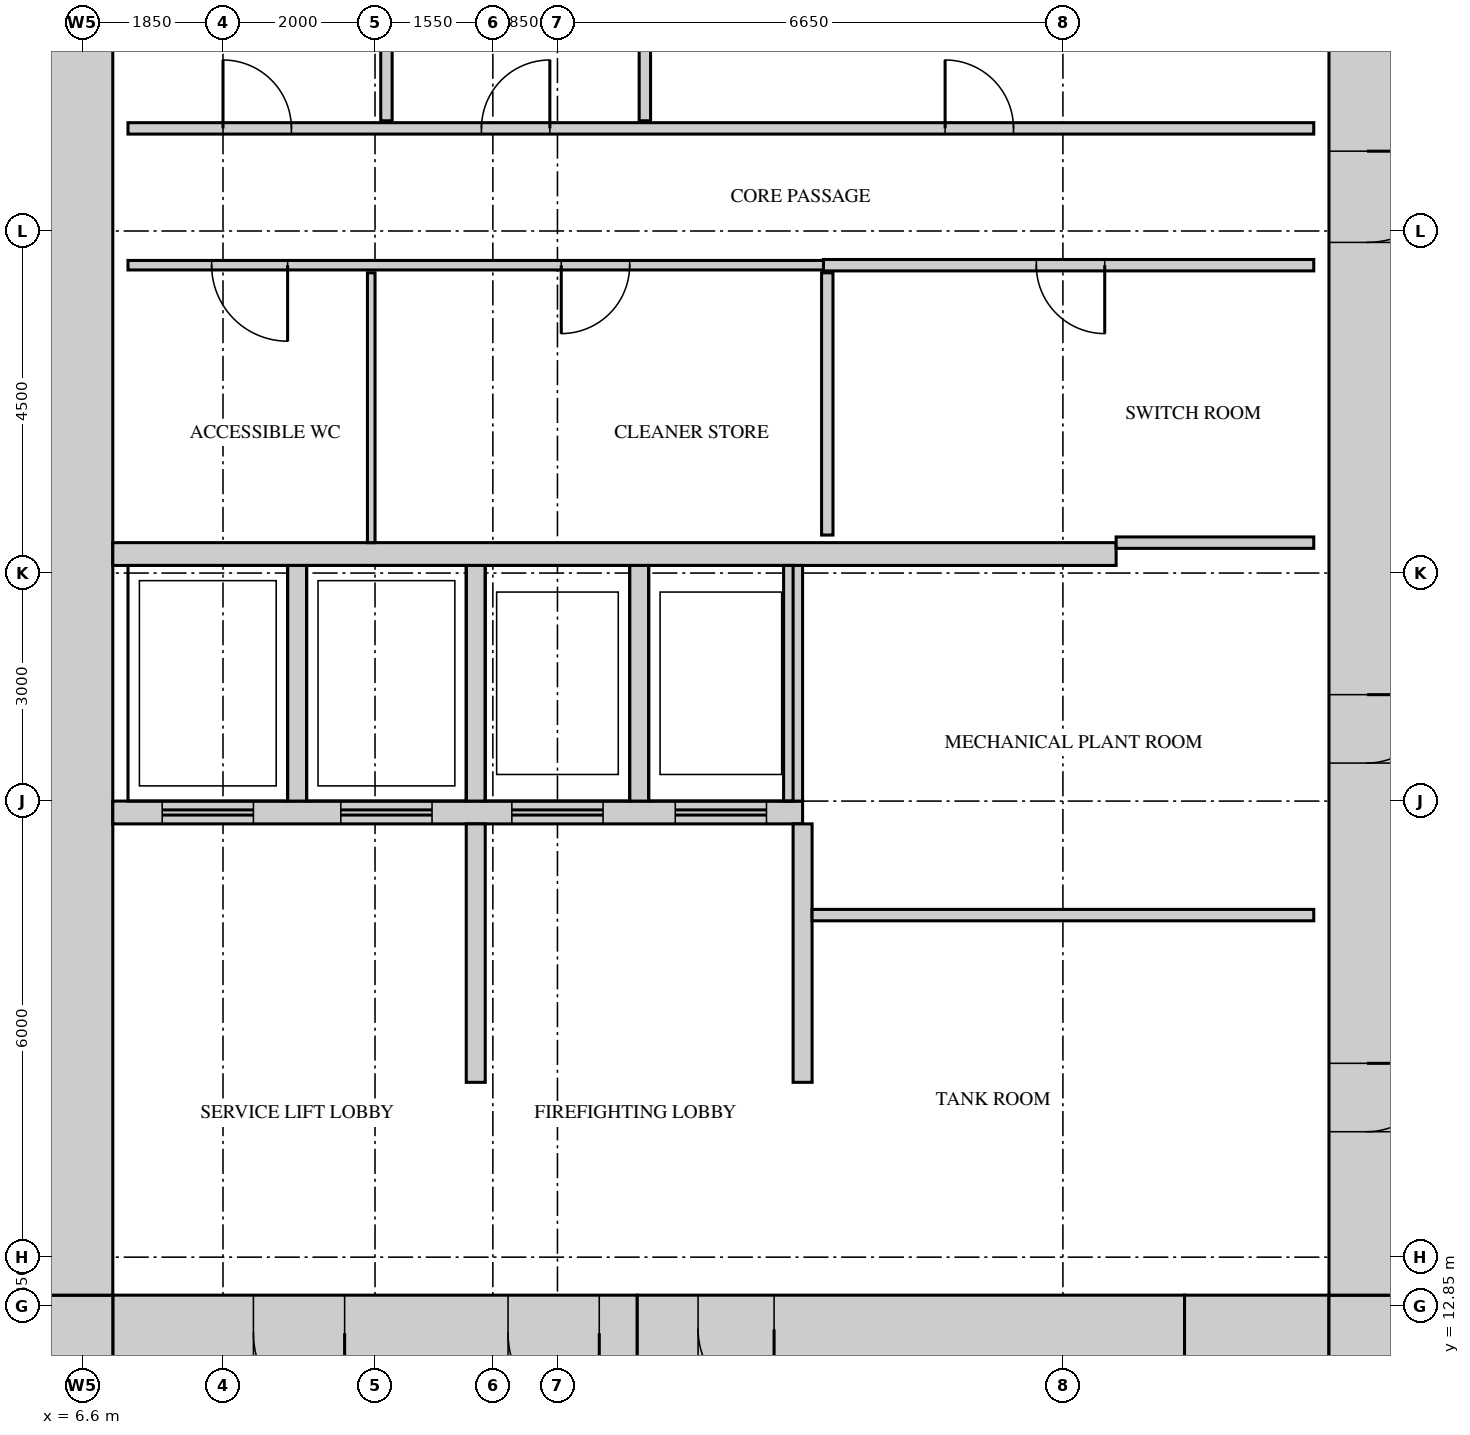
"""IFC4 building model, lengths in metres.
Left out: names, types, materials, properties, quantities, classifications, styles, units other than length and angle.
Written with IfcOpenShell. Run it as: python <this file> out.ifc"""

import sys

from ifc_helpers import new_model, si_unit, direction, frame, frame_2d, origin, place, context, subcontext, project, spatial, rectangle, extrude, source, transform, mapped, element, fill, save


model = new_model("IFC4")
c1 = context("Model", 3, precision=1e-05, world=origin(), true_north=direction((0.0, 1.0)))
c2 = subcontext(c1, "Body", "Model", "MODEL_VIEW")
j1 = project(units=[si_unit("LENGTHUNIT", "METRE"), si_unit("PLANEANGLEUNIT", "RADIAN")], contexts=[c1])
p1 = place(None, origin())
s1 = spatial("IfcSite", under=j1, at=p1, CompositionType="ELEMENT")
p2 = place(p1, origin())
s2 = spatial("IfcBuilding", under=s1, at=p2, CompositionType="ELEMENT")
p3 = place(p2, frame((0.0, 0.0, 123.5)))
s3 = spatial("IfcBuildingStorey", under=s2, at=p3, CompositionType="ELEMENT", Elevation=123.5)
m1 = source(origin(), c2, "Body", "SweptSolid", [
    extrude(rectangle(XDim=6.9, YDim=1.0, at=frame_2d((3.45, 0.0))), origin(), (0.0, 0.0, 1.0), 4.1),
])
p4 = place(p3, frame((7.0, 12.5, 0.0), z_axis=(0.0, 0.0, 1.0), x_axis=(1.0, 0.0, 0.0)))
e1 = element("IfcWall", 1, at=p4, inside=s3, PredefinedType="SHEAR", context=c2, shape_type="MappedRepresentation", body=[
    mapped(m1, transform((0.0, 0.0, 0.0))),
])
m2 = source(origin(), c2, "Body", "SweptSolid", [
    extrude(rectangle(XDim=1.2, YDim=2.1, at=frame_2d((0.6, 1.05))), frame((0.0, 0.51, 0.0), z_axis=(0.0, -1.0, 0.0), x_axis=(1.0, 0.0, 0.0)), (0.0, 0.0, 1.0), 1.02),
])
p5 = place(p4, frame((5.2, 0.0, 0.0)))
e2 = element("IfcOpeningElement", 2, at=p5, cuts=e1, PredefinedType="OPENING", context=c2, shape_type="MappedRepresentation", body=[
    mapped(m2, transform((0.0, 0.0, 0.0))),
])
p6 = place(p4, frame((1.85, 0.0, 0.0)))
e3 = element("IfcOpeningElement", 3, at=p6, cuts=e1, PredefinedType="OPENING", context=c2, shape_type="MappedRepresentation", body=[
    mapped(m2, transform((0.0, 0.0, 0.0))),
])
m3 = source(origin(), c2, "Body", "SweptSolid", [
    extrude(rectangle(XDim=7.2, YDim=0.9, at=frame_2d((3.6, 0.0))), origin(), (0.0, 0.0, 1.0), 4.1),
])
p7 = place(p3, frame((13.9, 12.55, 0.0), z_axis=(0.0, 0.0, 1.0), x_axis=(1.0, 0.0, 0.0)))
e4 = element("IfcWall", 4, at=p7, inside=s3, PredefinedType="SHEAR", context=c2, shape_type="MappedRepresentation", body=[
    mapped(m3, transform((0.0, 0.0, 0.0))),
])
m4 = source(origin(), c2, "Body", "SweptSolid", [
    extrude(rectangle(XDim=1.0, YDim=2.1, at=frame_2d((0.5, 1.05))), frame((0.0, 0.46, 0.0), z_axis=(0.0, -1.0, 0.0), x_axis=(1.0, 0.0, 0.0)), (0.0, 0.0, 1.0), 0.92),
])
p8 = place(p7, frame((0.8, 0.0, 0.0)))
e5 = element("IfcOpeningElement", 5, at=p8, cuts=e4, PredefinedType="OPENING", context=c2, shape_type="MappedRepresentation", body=[
    mapped(m4, transform((0.0, 0.0, 0.0))),
])
m5 = source(origin(), c2, "Body", "SweptSolid", [
    extrude(rectangle(XDim=1.9, YDim=1.0, at=frame_2d((0.95, 0.0))), origin(), (0.0, 0.0, 1.0), 4.1),
])
p9 = place(p3, frame((21.1, 12.5, 0.0), z_axis=(0.0, 0.0, 1.0), x_axis=(1.0, 0.0, 0.0)))
e6 = element("IfcWall", 6, at=p9, inside=s3, PredefinedType="SHEAR", context=c2, shape_type="MappedRepresentation", body=[
    mapped(m5, transform((0.0, 0.0, 0.0))),
])
m6 = source(origin(), c2, "Body", "SweptSolid", [
    extrude(rectangle(XDim=1.0, YDim=1.0, at=frame_2d((0.5, 0.0))), origin(), (0.0, 0.0, 1.0), 4.1),
])
for number, where, z_axis, x_axis in (
    (7, (23.0, 12.5, 0.0), (0.0, 0.0, 1.0), (1.0, 0.0, 0.0)),
    (8, (6.0, 12.5, 0.0), (0.0, 0.0, 1.0), (1.0, 0.0, 0.0)),
):
    element("IfcWall", number, at=place(p3, frame(where, z_axis=z_axis, x_axis=x_axis)), inside=s3, PredefinedType="SHEAR", context=c2, shape_type="MappedRepresentation", body=[
        mapped(m6, transform((0.0, 0.0, 0.0))),
    ])
m7 = source(origin(), c2, "Body", "SweptSolid", [
    extrude(rectangle(XDim=28.0, YDim=1.0, at=frame_2d((14.0, 0.0))), origin(), (0.0, 0.0, 1.0), 4.1),
])
p10 = place(p3, frame((23.5, 13.0, 0.0), z_axis=(0.0, 0.0, 1.0), x_axis=(0.0, 1.0, 0.0)))
e9 = element("IfcWall", 9, at=p10, inside=s3, PredefinedType="SHEAR", context=c2, shape_type="MappedRepresentation", body=[
    mapped(m7, transform((0.0, 0.0, 0.0))),
])
m8 = source(origin(), c2, "Body", "SweptSolid", [
    extrude(rectangle(XDim=1.8, YDim=2.1, at=frame_2d((0.9, 1.05))), frame((0.0, 0.51, 0.0), z_axis=(0.0, -1.0, 0.0), x_axis=(1.0, 0.0, 0.0)), (0.0, 0.0, 1.0), 1.02),
])
p11 = place(p10, frame((22.6, 0.0, 0.0)))
e10 = element("IfcOpeningElement", 10, at=p11, cuts=e9, PredefinedType="OPENING", context=c2, shape_type="MappedRepresentation", body=[
    mapped(m8, transform((0.0, 0.0, 0.0))),
])
p12 = place(p10, frame((13.85, 0.0, 0.0)))
e11 = element("IfcOpeningElement", 11, at=p12, cuts=e9, PredefinedType="OPENING", context=c2, shape_type="MappedRepresentation", body=[
    mapped(m2, transform((0.0, 0.0, 0.0))),
])
m9 = source(origin(), c2, "Body", "SweptSolid", [
    extrude(rectangle(XDim=0.9, YDim=2.1, at=frame_2d((0.45, 1.05))), frame((0.0, 0.51, 0.0), z_axis=(0.0, -1.0, 0.0), x_axis=(1.0, 0.0, 0.0)), (0.0, 0.0, 1.0), 1.02),
])
p13 = place(p10, frame((2.15, 0.0, 0.0)))
e12 = element("IfcOpeningElement", 12, at=p13, cuts=e9, PredefinedType="OPENING", context=c2, shape_type="MappedRepresentation", body=[
    mapped(m9, transform((0.0, 0.0, 0.0))),
])
p14 = place(p10, frame((7.0, 0.0, 0.0)))
e13 = element("IfcOpeningElement", 13, at=p14, cuts=e9, PredefinedType="OPENING", context=c2, shape_type="MappedRepresentation", body=[
    mapped(m9, transform((0.0, 0.0, 0.0))),
])
p15 = place(p3, frame((6.5, 13.0, 0.0), z_axis=(0.0, 0.0, 1.0), x_axis=(0.0, 1.0, 0.0)))
e14 = element("IfcWall", 14, at=p15, inside=s3, PredefinedType="SHEAR", context=c2, shape_type="MappedRepresentation", body=[
    mapped(m7, transform((0.0, 0.0, 0.0))),
])
m10 = source(origin(), c2, "Body", "SweptSolid", [
    extrude(rectangle(XDim=13.2, YDim=0.3, at=frame_2d((6.6, 0.0))), origin(), (0.0, 0.0, 1.0), 4.1),
])
p16 = place(p3, frame((7.0, 22.75, 0.0), z_axis=(0.0, 0.0, 1.0), x_axis=(1.0, 0.0, 0.0)))
e15 = element("IfcWall", 15, at=p16, inside=s3, PredefinedType="STANDARD", context=c2, shape_type="MappedRepresentation", body=[
    mapped(m10, transform((0.0, 0.0, 0.0))),
])
m11 = source(origin(), c2, "Body", "SweptSolid", [
    extrude(rectangle(XDim=9.075, YDim=0.3, at=frame_2d((4.538, 0.0))), origin(), (0.0, 0.0, 1.0), 4.1),
])
p17 = place(p3, frame((7.0, 19.35, 0.0), z_axis=(0.0, 0.0, 1.0), x_axis=(1.0, 0.0, 0.0)))
e16 = element("IfcWall", 16, at=p17, inside=s3, PredefinedType="STANDARD", context=c2, shape_type="MappedRepresentation", body=[
    mapped(m11, transform((0.0, 0.0, 0.0))),
])
m12 = source(origin(), c2, "Body", "SweptSolid", [
    extrude(rectangle(XDim=1.2, YDim=2.1, at=frame_2d((0.6, 1.05))), frame((0.0, 0.16, 0.0), z_axis=(0.0, -1.0, 0.0), x_axis=(1.0, 0.0, 0.0)), (0.0, 0.0, 1.0), 0.32),
])
p18 = place(p17, frame((0.65, 0.0, 0.0)))
e17 = element("IfcOpeningElement", 17, at=p18, cuts=e16, PredefinedType="OPENING", context=c2, shape_type="MappedRepresentation", body=[
    mapped(m12, transform((0.0, 0.0, 0.0))),
])
p19 = place(p17, frame((3.0, 0.0, 0.0)))
e18 = element("IfcOpeningElement", 18, at=p19, cuts=e16, PredefinedType="OPENING", context=c2, shape_type="MappedRepresentation", body=[
    mapped(m12, transform((0.0, 0.0, 0.0))),
])
p20 = place(p17, frame((5.25, 0.0, 0.0)))
e19 = element("IfcOpeningElement", 19, at=p20, cuts=e16, PredefinedType="OPENING", context=c2, shape_type="MappedRepresentation", body=[
    mapped(m12, transform((0.0, 0.0, 0.0))),
])
p21 = place(p17, frame((7.4, 0.0, 0.0)))
e20 = element("IfcOpeningElement", 20, at=p21, cuts=e16, PredefinedType="OPENING", context=c2, shape_type="MappedRepresentation", body=[
    mapped(m12, transform((0.0, 0.0, 0.0))),
])
m13 = source(origin(), c2, "Body", "SweptSolid", [
    extrude(rectangle(XDim=3.1, YDim=0.25, at=frame_2d((1.55, 0.0))), origin(), (0.0, 0.0, 1.0), 4.1),
])
for number, where, z_axis, x_axis in (
    (21, (9.425, 19.5, 0.0), (0.0, 0.0, 1.0), (0.0, 1.0, 0.0)),
    (22, (11.775, 19.5, 0.0), (0.0, 0.0, 1.0), (0.0, 1.0, 0.0)),
    (23, (13.925, 19.5, 0.0), (0.0, 0.0, 1.0), (0.0, 1.0, 0.0)),
    (24, (15.95, 19.5, 0.0), (0.0, 0.0, 1.0), (0.0, 1.0, 0.0)),
):
    element("IfcWall", number, at=place(p3, frame(where, z_axis=z_axis, x_axis=x_axis)), inside=s3, PredefinedType="STANDARD", context=c2, shape_type="MappedRepresentation", body=[
        mapped(m13, transform((0.0, 0.0, 0.0))),
    ])
m14 = source(origin(), c2, "Body", "SweptSolid", [
    extrude(rectangle(XDim=3.4, YDim=0.25, at=frame_2d((1.7, 0.0))), origin(), (0.0, 0.0, 1.0), 4.1),
])
for number, where, z_axis, x_axis in (
    (25, (16.075, 15.8, 0.0), (0.0, 0.0, 1.0), (0.0, 1.0, 0.0)),
    (26, (11.775, 15.8, 0.0), (0.0, 0.0, 1.0), (0.0, 1.0, 0.0)),
):
    element("IfcWall", number, at=place(p3, frame(where, z_axis=z_axis, x_axis=x_axis)), inside=s3, PredefinedType="STANDARD", context=c2, shape_type="MappedRepresentation", body=[
        mapped(m14, transform((0.0, 0.0, 0.0))),
    ])
m15 = source(origin(), c2, "Body", "SweptSolid", [
    extrude(rectangle(XDim=6.6, YDim=0.15, at=frame_2d((3.3, 0.0))), origin(), (0.0, 0.0, 1.0), 4.2),
])
p22 = place(p3, frame((16.2, 18.0, 0.0), z_axis=(0.0, 0.0, 1.0), x_axis=(1.0, 0.0, 0.0)))
e27 = element("IfcWall", 27, at=p22, inside=s3, PredefinedType="PARTITIONING", context=c2, shape_type="MappedRepresentation", body=[
    mapped(m15, transform((0.0, 0.0, 0.0))),
])
m16 = source(origin(), c2, "Body", "SweptSolid", [
    extrude(rectangle(XDim=3.55, YDim=0.1, at=frame_2d((1.775, 0.0))), origin(), (0.0, 0.0, 1.0), 4.2),
])
p23 = place(p3, frame((10.4, 22.9, 0.0), z_axis=(0.0, 0.0, 1.0), x_axis=(0.0, 1.0, 0.0)))
e28 = element("IfcWall", 28, at=p23, inside=s3, PredefinedType="PARTITIONING", context=c2, shape_type="MappedRepresentation", body=[
    mapped(m16, transform((0.0, 0.0, 0.0))),
])
m17 = source(origin(), c2, "Body", "SweptSolid", [
    extrude(rectangle(XDim=2.6, YDim=0.15, at=frame_2d((1.3, 0.0))), origin(), (0.0, 0.0, 1.0), 4.2),
])
p24 = place(p3, frame((20.2, 22.9, 0.0), z_axis=(0.0, 0.0, 1.0), x_axis=(1.0, 0.0, 0.0)))
e29 = element("IfcWall", 29, at=p24, inside=s3, PredefinedType="PARTITIONING", context=c2, shape_type="MappedRepresentation", body=[
    mapped(m17, transform((0.0, 0.0, 0.0))),
])
m18 = source(origin(), c2, "Body", "SweptSolid", [
    extrude(rectangle(XDim=3.45, YDim=0.15, at=frame_2d((1.725, 0.0))), origin(), (0.0, 0.0, 1.0), 4.2),
])
p25 = place(p3, frame((16.4, 23.0, 0.0), z_axis=(0.0, 0.0, 1.0), x_axis=(0.0, 1.0, 0.0)))
e30 = element("IfcWall", 30, at=p25, inside=s3, PredefinedType="PARTITIONING", context=c2, shape_type="MappedRepresentation", body=[
    mapped(m18, transform((0.0, 0.0, 0.0))),
])
m19 = source(origin(), c2, "Body", "SweptSolid", [
    extrude(rectangle(XDim=9.15, YDim=0.125, at=frame_2d((4.575, 0.0))), origin(), (0.0, 0.0, 1.0), 4.2),
])
p26 = place(p3, frame((7.2, 26.55, 0.0), z_axis=(0.0, 0.0, 1.0), x_axis=(1.0, 0.0, 0.0)))
e31 = element("IfcWall", 31, at=p26, inside=s3, PredefinedType="PARTITIONING", context=c2, shape_type="MappedRepresentation", body=[
    mapped(m19, transform((0.0, 0.0, 0.0))),
])
m20 = source(origin(), c2, "Body", "SweptSolid", [
    extrude(rectangle(XDim=1.0, YDim=2.1, at=frame_2d((0.5, 1.05))), frame((0.0, 0.073, 0.0), z_axis=(0.0, -1.0, 0.0), x_axis=(1.0, 0.0, 0.0)), (0.0, 0.0, 1.0), 0.145),
])
p27 = place(p26, frame((1.1, 0.0, 0.0)))
e32 = element("IfcOpeningElement", 32, at=p27, cuts=e31, PredefinedType="OPENING", context=c2, shape_type="MappedRepresentation", body=[
    mapped(m20, transform((0.0, 0.0, 0.0))),
])
m21 = source(origin(), c2, "Body", "SweptSolid", [
    extrude(rectangle(XDim=0.9, YDim=2.1, at=frame_2d((0.45, 1.05))), frame((0.0, 0.073, 0.0), z_axis=(0.0, -1.0, 0.0), x_axis=(1.0, 0.0, 0.0)), (0.0, 0.0, 1.0), 0.145),
])
p28 = place(p26, frame((5.7, 0.0, 0.0)))
e33 = element("IfcOpeningElement", 33, at=p28, cuts=e31, PredefinedType="OPENING", context=c2, shape_type="MappedRepresentation", body=[
    mapped(m21, transform((0.0, 0.0, 0.0))),
])
m22 = source(origin(), c2, "Body", "SweptSolid", [
    extrude(rectangle(XDim=6.45, YDim=0.15, at=frame_2d((3.225, 0.0))), origin(), (0.0, 0.0, 1.0), 4.2),
])
p29 = place(p3, frame((16.35, 26.55, 0.0), z_axis=(0.0, 0.0, 1.0), x_axis=(1.0, 0.0, 0.0)))
e34 = element("IfcWall", 34, at=p29, inside=s3, PredefinedType="PARTITIONING", context=c2, shape_type="MappedRepresentation", body=[
    mapped(m22, transform((0.0, 0.0, 0.0))),
])
m23 = source(origin(), c2, "Body", "SweptSolid", [
    extrude(rectangle(XDim=0.9, YDim=2.1, at=frame_2d((0.45, 1.05))), frame((0.0, 0.085, 0.0), z_axis=(0.0, -1.0, 0.0), x_axis=(1.0, 0.0, 0.0)), (0.0, 0.0, 1.0), 0.17),
])
p30 = place(p29, frame((2.8, 0.0, 0.0)))
e35 = element("IfcOpeningElement", 35, at=p30, cuts=e34, PredefinedType="OPENING", context=c2, shape_type="MappedRepresentation", body=[
    mapped(m23, transform((0.0, 0.0, 0.0))),
])
m24 = source(origin(), c2, "Body", "SweptSolid", [
    extrude(rectangle(XDim=15.6, YDim=0.15, at=frame_2d((7.8, 0.0))), origin(), (0.0, 0.0, 1.0), 4.2),
])
p31 = place(p3, frame((7.2, 28.35, 0.0), z_axis=(0.0, 0.0, 1.0), x_axis=(1.0, 0.0, 0.0)))
e36 = element("IfcWall", 36, at=p31, inside=s3, PredefinedType="PARTITIONING", context=c2, shape_type="MappedRepresentation", body=[
    mapped(m24, transform((0.0, 0.0, 0.0))),
])
p32 = place(p31, frame((1.25, 0.0, 0.0)))
e37 = element("IfcOpeningElement", 37, at=p32, cuts=e36, PredefinedType="OPENING", context=c2, shape_type="MappedRepresentation", body=[
    mapped(m23, transform((0.0, 0.0, 0.0))),
])
p33 = place(p31, frame((4.65, 0.0, 0.0)))
e38 = element("IfcOpeningElement", 38, at=p33, cuts=e36, PredefinedType="OPENING", context=c2, shape_type="MappedRepresentation", body=[
    mapped(m23, transform((0.0, 0.0, 0.0))),
])
p34 = place(p31, frame((10.75, 0.0, 0.0)))
e39 = element("IfcOpeningElement", 39, at=p34, cuts=e36, PredefinedType="OPENING", context=c2, shape_type="MappedRepresentation", body=[
    mapped(m23, transform((0.0, 0.0, 0.0))),
])
for number, where, z_axis, x_axis in (
    (40, (10.6, 28.45, 0.0), (0.0, 0.0, 1.0), (0.0, 1.0, 0.0)),
    (41, (14.0, 28.45, 0.0), (0.0, 0.0, 1.0), (0.0, 1.0, 0.0)),
):
    element("IfcWall", number, at=place(p3, frame(where, z_axis=z_axis, x_axis=x_axis)), inside=s3, PredefinedType="PARTITIONING", context=c2, shape_type="MappedRepresentation", body=[
        mapped(m18, transform((0.0, 0.0, 0.0))),
    ])
m25 = source(origin(), c2, "Body", "SweptSolid", [
    extrude(rectangle(XDim=1.2, YDim=2.1, at=frame_2d((0.6, 1.05))), frame((0.0, 0.45, 0.0), z_axis=(0.0, -1.0, 0.0), x_axis=(1.0, 0.0, 0.0)), (0.0, 0.0, 1.0), 0.9),
])
p35 = place(p12, origin())
e42 = element("IfcDoor", 42, at=p35, inside=s3, OperationType="SINGLE_SWING_RIGHT", PredefinedType="DOOR", context=c2, shape_type="MappedRepresentation", body=[
    mapped(m25, transform((0.0, 0.0, 0.0))),
])
fill(e11, e42)
m26 = source(origin(), c2, "Body", "SweptSolid", [
    extrude(rectangle(XDim=0.9, YDim=2.1, at=frame_2d((0.45, 1.05))), frame((0.0, 0.025, 0.0), z_axis=(0.0, -1.0, 0.0), x_axis=(1.0, 0.0, 0.0)), (0.0, 0.0, 1.0), 0.05),
])
p36 = place(p32, origin())
e43 = element("IfcDoor", 43, at=p36, inside=s3, OperationType="SINGLE_SWING_RIGHT", PredefinedType="DOOR", context=c2, shape_type="MappedRepresentation", body=[
    mapped(m26, transform((0.0, 0.0, 0.0))),
])
fill(e37, e43)
p37 = place(p33, origin())
e44 = element("IfcDoor", 44, at=p37, inside=s3, OperationType="SINGLE_SWING_LEFT", PredefinedType="DOOR", context=c2, shape_type="MappedRepresentation", body=[
    mapped(m26, transform((0.0, 0.0, 0.0))),
])
fill(e38, e44)
p38 = place(p34, origin())
e45 = element("IfcDoor", 45, at=p38, inside=s3, OperationType="SINGLE_SWING_RIGHT", PredefinedType="DOOR", context=c2, shape_type="MappedRepresentation", body=[
    mapped(m26, transform((0.0, 0.0, 0.0))),
])
fill(e39, e45)
m27 = source(origin(), c2, "Body", "SweptSolid", [
    extrude(rectangle(XDim=1.0, YDim=2.1, at=frame_2d((0.5, 1.05))), frame((0.0, 0.025, 0.0), z_axis=(0.0, -1.0, 0.0), x_axis=(1.0, 0.0, 0.0)), (0.0, 0.0, 1.0), 0.05),
])
p39 = place(p27, origin())
e46 = element("IfcDoor", 46, at=p39, inside=s3, OperationType="SINGLE_SWING_RIGHT", PredefinedType="DOOR", context=c2, shape_type="MappedRepresentation", body=[
    mapped(m27, transform((0.0, 0.0, 0.0))),
])
fill(e32, e46)
p40 = place(p28, origin())
e47 = element("IfcDoor", 47, at=p40, inside=s3, OperationType="SINGLE_SWING_LEFT", PredefinedType="DOOR", context=c2, shape_type="MappedRepresentation", body=[
    mapped(m26, transform((0.0, 0.0, 0.0))),
])
fill(e33, e47)
p41 = place(p30, origin())
e48 = element("IfcDoor", 48, at=p41, inside=s3, OperationType="SINGLE_SWING_RIGHT", PredefinedType="DOOR", context=c2, shape_type="MappedRepresentation", body=[
    mapped(m26, transform((0.0, 0.0, 0.0))),
])
fill(e35, e48)
m28 = source(origin(), c2, "Body", "SweptSolid", [
    extrude(rectangle(XDim=0.9, YDim=2.1, at=frame_2d((0.45, 1.05))), frame((0.0, 0.45, 0.0), z_axis=(0.0, -1.0, 0.0), x_axis=(1.0, 0.0, 0.0)), (0.0, 0.0, 1.0), 0.9),
])
p42 = place(p13, origin())
e49 = element("IfcDoor", 49, at=p42, inside=s3, OperationType="SINGLE_SWING_RIGHT", PredefinedType="DOOR", context=c2, shape_type="MappedRepresentation", body=[
    mapped(m28, transform((0.0, 0.0, 0.0))),
])
fill(e12, e49)
p43 = place(p14, origin())
e50 = element("IfcDoor", 50, at=p43, inside=s3, OperationType="SINGLE_SWING_RIGHT", PredefinedType="DOOR", context=c2, shape_type="MappedRepresentation", body=[
    mapped(m28, transform((0.0, 0.0, 0.0))),
])
fill(e13, e50)
p44 = place(p5, origin())
e51 = element("IfcDoor", 51, at=p44, inside=s3, OperationType="SINGLE_SWING_RIGHT", PredefinedType="DOOR", context=c2, shape_type="MappedRepresentation", body=[
    mapped(m25, transform((0.0, 0.0, 0.0))),
])
fill(e2, e51)
p45 = place(p6, origin())
e52 = element("IfcDoor", 52, at=p45, inside=s3, OperationType="SINGLE_SWING_RIGHT", PredefinedType="DOOR", context=c2, shape_type="MappedRepresentation", body=[
    mapped(m25, transform((0.0, 0.0, 0.0))),
])
fill(e3, e52)
m29 = source(origin(), c2, "Body", "SweptSolid", [
    extrude(rectangle(XDim=1.0, YDim=2.1, at=frame_2d((0.5, 1.05))), frame((0.0, 0.4, 0.0), z_axis=(0.0, -1.0, 0.0), x_axis=(1.0, 0.0, 0.0)), (0.0, 0.0, 1.0), 0.8),
])
p46 = place(p8, origin())
e53 = element("IfcDoor", 53, at=p46, inside=s3, OperationType="SINGLE_SWING_RIGHT", PredefinedType="DOOR", context=c2, shape_type="MappedRepresentation", body=[
    mapped(m29, transform((0.0, 0.0, 0.0))),
])
fill(e5, e53)
m30 = source(origin(), c2, "Body", "SweptSolid", [
    extrude(rectangle(XDim=1.2, YDim=2.1, at=frame_2d((0.6, 1.05))), frame((0.0, 0.025, 0.0), z_axis=(0.0, -1.0, 0.0), x_axis=(1.0, 0.0, 0.0)), (0.0, 0.0, 1.0), 0.05),
])
p47 = place(p18, origin())
e54 = element("IfcDoor", 54, at=p47, inside=s3, OperationType="DOUBLE_DOOR_SLIDING", PredefinedType="DOOR", context=c2, shape_type="MappedRepresentation", body=[
    mapped(m30, transform((0.0, 0.0, 0.0))),
])
fill(e17, e54)
p48 = place(p19, origin())
e55 = element("IfcDoor", 55, at=p48, inside=s3, OperationType="DOUBLE_DOOR_SLIDING", PredefinedType="DOOR", context=c2, shape_type="MappedRepresentation", body=[
    mapped(m30, transform((0.0, 0.0, 0.0))),
])
fill(e18, e55)
p49 = place(p20, origin())
e56 = element("IfcDoor", 56, at=p49, inside=s3, OperationType="DOUBLE_DOOR_SLIDING", PredefinedType="DOOR", context=c2, shape_type="MappedRepresentation", body=[
    mapped(m30, transform((0.0, 0.0, 0.0))),
])
fill(e19, e56)
p50 = place(p21, origin())
e57 = element("IfcDoor", 57, at=p50, inside=s3, OperationType="DOUBLE_DOOR_SLIDING", PredefinedType="DOOR", context=c2, shape_type="MappedRepresentation", body=[
    mapped(m30, transform((0.0, 0.0, 0.0))),
])
fill(e20, e57)
save(model, sys.argv[1])
